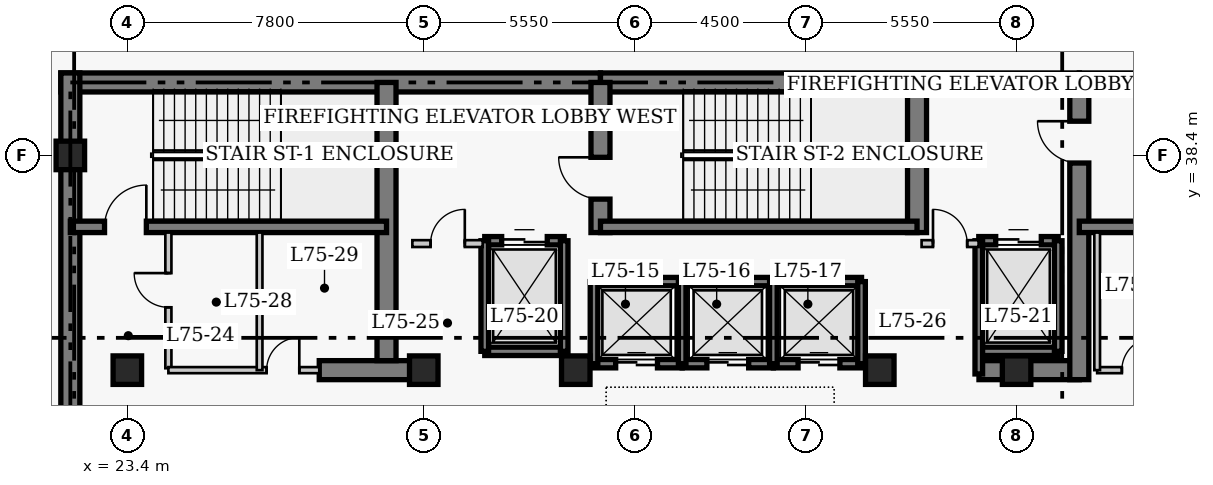
"""IFC4 building model, lengths in metres.
Left out: names, types, materials, properties, quantities, classifications, styles, units other than length and angle.
Written with IfcOpenShell. Run it as: python <this file> out.ifc"""

import sys

from ifc_helpers import new_model, si_unit, direction, frame, frame_2d, origin, origin_2d, place, context, subcontext, project, spatial, rectangle, extrude, element, fill, save


model = new_model("IFC4")
c1 = context("Model", 3, precision=1e-05, world=origin(), true_north=direction((0.0, 1.0)))
c2 = subcontext(c1, "Body", "Model", "MODEL_VIEW")
j1 = project(units=[si_unit("LENGTHUNIT", "METRE"), si_unit("PLANEANGLEUNIT", "RADIAN")], contexts=[c1])
p1 = place(None, origin())
s1 = spatial("IfcSite", under=j1, at=p1, CompositionType="ELEMENT")
p2 = place(p1, origin())
s2 = spatial("IfcBuilding", under=s1, at=p2, CompositionType="ELEMENT")
p3 = place(p2, frame((0.0, 0.0, 302.0)))
s3 = spatial("IfcBuildingStorey", under=s2, at=p3, CompositionType="ELEMENT", Elevation=302.0)
p4 = place(p3, frame((21.65, 40.32, 0.0), z_axis=(0.0, 0.0, 1.0), x_axis=(1.0, 0.0, 0.0)))
e1 = element("IfcWall", 1, at=p4, inside=s3, PredefinedType="SHEAR", context=c2, shape_type="SweptSolid", body=[
    extrude(rectangle(XDim=14.2, YDim=0.5, at=frame_2d((7.1, 0.0))), origin(), (0.0, 0.0, 1.0), 4.6),
])
p5 = place(p3, frame((35.85, 40.32, 0.0), z_axis=(0.0, 0.0, 1.0), x_axis=(1.0, 0.0, 0.0)))
e2 = element("IfcWall", 2, at=p5, inside=s3, PredefinedType="SHEAR", context=c2, shape_type="SweptSolid", body=[
    extrude(rectangle(XDim=12.6, YDim=0.5, at=frame_2d((6.3, 0.0))), origin(), (0.0, 0.0, 1.0), 4.6),
])
p6 = place(p3, frame((48.45, 40.32, 0.0), z_axis=(0.0, 0.0, 1.0), x_axis=(1.0, 0.0, 0.0)))
e3 = element("IfcWall", 3, at=p6, inside=s3, PredefinedType="SHEAR", context=c2, shape_type="SweptSolid", body=[
    extrude(rectangle(XDim=8.57, YDim=0.5, at=frame_2d((4.285, 0.0))), origin(), (0.0, 0.0, 1.0), 4.6),
])
p7 = place(p3, frame((21.9, 27.05, 0.0), z_axis=(0.0, 0.0, 1.0), x_axis=(0.0, 1.0, 0.0)))
e4 = element("IfcWall", 4, at=p7, inside=s3, PredefinedType="SHEAR", context=c2, shape_type="SweptSolid", body=[
    extrude(rectangle(XDim=13.52, YDim=0.5, at=frame_2d((6.76, 0.0))), origin(), (0.0, 0.0, 1.0), 4.6),
])
p8 = place(p3, frame((28.45, 32.75, 0.0), z_axis=(0.0, 0.0, 1.0), x_axis=(1.0, 0.0, 0.0)))
e5 = element("IfcWall", 5, at=p8, inside=s3, PredefinedType="SHEAR", context=c2, shape_type="SweptSolid", body=[
    extrude(rectangle(XDim=2.4, YDim=0.5, at=frame_2d((1.2, 0.0))), origin(), (0.0, 0.0, 1.0), 4.6),
])
p9 = place(p3, frame((45.81, 32.75, 0.0), z_axis=(0.0, 0.0, 1.0), x_axis=(1.0, 0.0, 0.0)))
e6 = element("IfcWall", 6, at=p9, inside=s3, PredefinedType="SHEAR", context=c2, shape_type="SweptSolid", body=[
    extrude(rectangle(XDim=2.64, YDim=0.5, at=frame_2d((1.32, 0.0))), origin(), (0.0, 0.0, 1.0), 4.6),
])
p10 = place(p3, frame((30.22, 33.0, 0.0), z_axis=(0.0, 0.0, 1.0), x_axis=(0.0, 1.0, 0.0)))
e7 = element("IfcWall", 7, at=p10, inside=s3, PredefinedType="SHEAR", context=c2, shape_type="SweptSolid", body=[
    extrude(rectangle(XDim=7.32, YDim=0.5, at=frame_2d((3.66, 0.0))), origin(), (0.0, 0.0, 1.0), 4.6),
])
p11 = place(p3, frame((35.85, 36.37, 0.0), z_axis=(0.0, 0.0, 1.0), x_axis=(0.0, 1.0, 0.0)))
e8 = element("IfcWall", 8, at=p11, inside=s3, PredefinedType="SHEAR", context=c2, shape_type="SweptSolid", body=[
    extrude(rectangle(XDim=3.95, YDim=0.5, at=frame_2d((1.975, 0.0))), origin(), (0.0, 0.0, 1.0), 4.6),
])
p12 = place(p11, frame((0.88, 0.0, 0.0)))
e9 = element("IfcOpeningElement", 9, at=p12, cuts=e8, PredefinedType="OPENING", context=c2, shape_type="SweptSolid", body=[
    extrude(rectangle(XDim=1.1, YDim=2.15, at=frame_2d((0.55, 1.075))), frame((0.0, 0.26, 0.0), z_axis=(0.0, -1.0, 0.0), x_axis=(1.0, 0.0, 0.0)), (0.0, 0.0, 1.0), 0.52),
])
p13 = place(p3, frame((44.18, 36.37, 0.0), z_axis=(0.0, 0.0, 1.0), x_axis=(0.0, 1.0, 0.0)))
e10 = element("IfcWall", 10, at=p13, inside=s3, PredefinedType="SHEAR", context=c2, shape_type="SweptSolid", body=[
    extrude(rectangle(XDim=3.95, YDim=0.5, at=frame_2d((1.975, 0.0))), origin(), (0.0, 0.0, 1.0), 4.6),
])
p14 = place(p3, frame((48.45, 32.5, 0.0), z_axis=(0.0, 0.0, 1.0), x_axis=(0.0, 1.0, 0.0)))
e11 = element("IfcWall", 11, at=p14, inside=s3, PredefinedType="SHEAR", context=c2, shape_type="SweptSolid", body=[
    extrude(rectangle(XDim=7.82, YDim=0.5, at=frame_2d((3.91, 0.0))), origin(), (0.0, 0.0, 1.0), 4.6),
])
p15 = place(p14, frame((5.7, 0.0, 0.0)))
e12 = element("IfcOpeningElement", 12, at=p15, cuts=e11, PredefinedType="OPENING", context=c2, shape_type="SweptSolid", body=[
    extrude(rectangle(XDim=1.1, YDim=2.15, at=frame_2d((0.55, 1.075))), frame((0.0, 0.26, 0.0), z_axis=(0.0, -1.0, 0.0), x_axis=(1.0, 0.0, 0.0)), (0.0, 0.0, 1.0), 0.52),
])
p16 = place(p3, frame((21.9, 36.52, 0.0), z_axis=(0.0, 0.0, 1.0), x_axis=(1.0, 0.0, 0.0)))
e13 = element("IfcWall", 13, at=p16, inside=s3, PredefinedType="SHEAR", context=c2, shape_type="SweptSolid", body=[
    extrude(rectangle(XDim=8.32, YDim=0.3, at=frame_2d((4.16, 0.0))), origin(), (0.0, 0.0, 1.0), 4.6),
])
p17 = place(p16, frame((0.9, 0.0, 0.0)))
e14 = element("IfcOpeningElement", 14, at=p17, cuts=e13, PredefinedType="OPENING", context=c2, shape_type="SweptSolid", body=[
    extrude(rectangle(XDim=1.1, YDim=2.15, at=frame_2d((0.55, 1.075))), frame((0.0, 0.16, 0.0), z_axis=(0.0, -1.0, 0.0), x_axis=(1.0, 0.0, 0.0)), (0.0, 0.0, 1.0), 0.32),
])
p18 = place(p3, frame((35.85, 36.52, 0.0), z_axis=(0.0, 0.0, 1.0), x_axis=(1.0, 0.0, 0.0)))
e15 = element("IfcWall", 15, at=p18, inside=s3, PredefinedType="SHEAR", context=c2, shape_type="SweptSolid", body=[
    extrude(rectangle(XDim=8.33, YDim=0.3, at=frame_2d((4.165, 0.0))), origin(), (0.0, 0.0, 1.0), 4.6),
])
p19 = place(p3, frame((48.45, 36.52, 0.0), z_axis=(0.0, 0.0, 1.0), x_axis=(1.0, 0.0, 0.0)))
e16 = element("IfcWall", 16, at=p19, inside=s3, PredefinedType="SHEAR", context=c2, shape_type="SweptSolid", body=[
    extrude(rectangle(XDim=8.32, YDim=0.3, at=frame_2d((4.16, 0.0))), origin(), (0.0, 0.0, 1.0), 4.6),
])
for number, where, z_axis, x_axis in (
    (17, (21.9, 38.4, 0.0), (0.0, 0.0, 1.0), (1.0, 0.0, 0.0)),
    (18, (23.4, 32.75, 0.0), (0.0, 0.0, 1.0), (1.0, 0.0, 0.0)),
    (19, (31.2, 32.75, 0.0), (0.0, 0.0, 1.0), (1.0, 0.0, 0.0)),
    (20, (35.2, 32.75, 0.0), (0.0, 0.0, 1.0), (1.0, 0.0, 0.0)),
    (21, (43.2, 32.75, 0.0), (0.0, 0.0, 1.0), (1.0, 0.0, 0.0)),
    (22, (46.8, 32.75, 0.0), (0.0, 0.0, 1.0), (1.0, 0.0, 0.0)),
):
    element("IfcColumn", number, at=place(p3, frame(where, z_axis=z_axis, x_axis=x_axis)), inside=s3, PredefinedType="COLUMN", context=c2, shape_type="SweptSolid", body=[
        extrude(rectangle(XDim=0.75, YDim=0.75, at=origin_2d()), origin(), (0.0, 0.0, 1.0), 4.6),
    ])
p20 = place(p3, frame((35.68, 35.08, 0.0), z_axis=(0.0, 0.0, 1.0), x_axis=(1.0, 0.0, 0.0)))
e23 = element("IfcWall", 23, at=p20, inside=s3, PredefinedType="SHEAR", context=c2, shape_type="SweptSolid", body=[
    extrude(rectangle(XDim=2.32, YDim=0.22, at=frame_2d((1.16, 0.0))), origin(), (0.0, 0.0, 1.0), 4.6),
])
p21 = place(p3, frame((35.68, 32.92, 0.0), z_axis=(0.0, 0.0, 1.0), x_axis=(1.0, 0.0, 0.0)))
e24 = element("IfcWall", 24, at=p21, inside=s3, PredefinedType="SHEAR", context=c2, shape_type="SweptSolid", body=[
    extrude(rectangle(XDim=2.32, YDim=0.22, at=frame_2d((1.16, 0.0))), origin(), (0.0, 0.0, 1.0), 4.6),
])
p22 = place(p21, frame((0.57, 0.0, 0.0)))
e25 = element("IfcOpeningElement", 25, at=p22, cuts=e24, PredefinedType="OPENING", context=c2, shape_type="SweptSolid", body=[
    extrude(rectangle(XDim=1.1, YDim=2.15, at=frame_2d((0.55, 1.075))), frame((0.0, 0.12, 0.0), z_axis=(0.0, -1.0, 0.0), x_axis=(1.0, 0.0, 0.0)), (0.0, 0.0, 1.0), 0.24),
])
p23 = place(p3, frame((35.68, 32.92, 0.0), z_axis=(0.0, 0.0, 1.0), x_axis=(0.0, 1.0, 0.0)))
e26 = element("IfcWall", 26, at=p23, inside=s3, PredefinedType="SHEAR", context=c2, shape_type="SweptSolid", body=[
    extrude(rectangle(XDim=2.16, YDim=0.2, at=frame_2d((1.08, 0.0))), origin(), (0.0, 0.0, 1.0), 4.6),
])
p24 = place(p3, frame((38.0, 35.08, 0.0), z_axis=(0.0, 0.0, 1.0), x_axis=(1.0, 0.0, 0.0)))
e27 = element("IfcWall", 27, at=p24, inside=s3, PredefinedType="SHEAR", context=c2, shape_type="SweptSolid", body=[
    extrude(rectangle(XDim=2.4, YDim=0.22, at=frame_2d((1.2, 0.0))), origin(), (0.0, 0.0, 1.0), 4.6),
])
p25 = place(p3, frame((38.0, 32.92, 0.0), z_axis=(0.0, 0.0, 1.0), x_axis=(1.0, 0.0, 0.0)))
e28 = element("IfcWall", 28, at=p25, inside=s3, PredefinedType="SHEAR", context=c2, shape_type="SweptSolid", body=[
    extrude(rectangle(XDim=2.4, YDim=0.22, at=frame_2d((1.2, 0.0))), origin(), (0.0, 0.0, 1.0), 4.6),
])
p26 = place(p25, frame((0.65, 0.0, 0.0)))
e29 = element("IfcOpeningElement", 29, at=p26, cuts=e28, PredefinedType="OPENING", context=c2, shape_type="SweptSolid", body=[
    extrude(rectangle(XDim=1.1, YDim=2.15, at=frame_2d((0.55, 1.075))), frame((0.0, 0.12, 0.0), z_axis=(0.0, -1.0, 0.0), x_axis=(1.0, 0.0, 0.0)), (0.0, 0.0, 1.0), 0.24),
])
p27 = place(p3, frame((38.0, 32.92, 0.0), z_axis=(0.0, 0.0, 1.0), x_axis=(0.0, 1.0, 0.0)))
e30 = element("IfcWall", 30, at=p27, inside=s3, PredefinedType="SHEAR", context=c2, shape_type="SweptSolid", body=[
    extrude(rectangle(XDim=2.16, YDim=0.2, at=frame_2d((1.08, 0.0))), origin(), (0.0, 0.0, 1.0), 4.6),
])
p28 = place(p3, frame((40.4, 35.08, 0.0), z_axis=(0.0, 0.0, 1.0), x_axis=(1.0, 0.0, 0.0)))
e31 = element("IfcWall", 31, at=p28, inside=s3, PredefinedType="SHEAR", context=c2, shape_type="SweptSolid", body=[
    extrude(rectangle(XDim=2.32, YDim=0.22, at=frame_2d((1.16, 0.0))), origin(), (0.0, 0.0, 1.0), 4.6),
])
p29 = place(p3, frame((40.4, 32.92, 0.0), z_axis=(0.0, 0.0, 1.0), x_axis=(1.0, 0.0, 0.0)))
e32 = element("IfcWall", 32, at=p29, inside=s3, PredefinedType="SHEAR", context=c2, shape_type="SweptSolid", body=[
    extrude(rectangle(XDim=2.32, YDim=0.22, at=frame_2d((1.16, 0.0))), origin(), (0.0, 0.0, 1.0), 4.6),
])
p30 = place(p29, frame((0.65, 0.0, 0.0)))
e33 = element("IfcOpeningElement", 33, at=p30, cuts=e32, PredefinedType="OPENING", context=c2, shape_type="SweptSolid", body=[
    extrude(rectangle(XDim=1.1, YDim=2.15, at=frame_2d((0.55, 1.075))), frame((0.0, 0.12, 0.0), z_axis=(0.0, -1.0, 0.0), x_axis=(1.0, 0.0, 0.0)), (0.0, 0.0, 1.0), 0.24),
])
for number, where, z_axis, x_axis in (
    (34, (40.4, 32.92, 0.0), (0.0, 0.0, 1.0), (0.0, 1.0, 0.0)),
    (35, (42.72, 32.92, 0.0), (0.0, 0.0, 1.0), (0.0, 1.0, 0.0)),
):
    element("IfcWall", number, at=place(p3, frame(where, z_axis=z_axis, x_axis=x_axis)), inside=s3, PredefinedType="SHEAR", context=c2, shape_type="SweptSolid", body=[
        extrude(rectangle(XDim=2.16, YDim=0.2, at=frame_2d((1.08, 0.0))), origin(), (0.0, 0.0, 1.0), 4.6),
    ])
p31 = place(p3, frame((32.805, 36.155, 0.0), z_axis=(0.0, 0.0, 1.0), x_axis=(1.0, 0.0, 0.0)))
e36 = element("IfcWall", 36, at=p31, inside=s3, PredefinedType="SHEAR", context=c2, shape_type="SweptSolid", body=[
    extrude(rectangle(XDim=2.09, YDim=0.22, at=frame_2d((1.045, 0.0))), origin(), (0.0, 0.0, 1.0), 4.6),
])
p32 = place(p31, frame((0.445, 0.0, 0.0)))
e37 = element("IfcOpeningElement", 37, at=p32, cuts=e36, PredefinedType="OPENING", context=c2, shape_type="SweptSolid", body=[
    extrude(rectangle(XDim=1.2, YDim=2.15, at=frame_2d((0.6, 1.075))), frame((0.0, 0.12, 0.0), z_axis=(0.0, -1.0, 0.0), x_axis=(1.0, 0.0, 0.0)), (0.0, 0.0, 1.0), 0.24),
])
p33 = place(p3, frame((32.805, 33.245, 0.0), z_axis=(0.0, 0.0, 1.0), x_axis=(1.0, 0.0, 0.0)))
e38 = element("IfcWall", 38, at=p33, inside=s3, PredefinedType="SHEAR", context=c2, shape_type="SweptSolid", body=[
    extrude(rectangle(XDim=2.09, YDim=0.22, at=frame_2d((1.045, 0.0))), origin(), (0.0, 0.0, 1.0), 4.6),
])
for number, where, z_axis, x_axis in (
    (39, (32.805, 33.245, 0.0), (0.0, 0.0, 1.0), (0.0, 1.0, 0.0)),
    (40, (34.895, 33.245, 0.0), (0.0, 0.0, 1.0), (0.0, 1.0, 0.0)),
):
    element("IfcWall", number, at=place(p3, frame(where, z_axis=z_axis, x_axis=x_axis)), inside=s3, PredefinedType="SHEAR", context=c2, shape_type="SweptSolid", body=[
        extrude(rectangle(XDim=2.91, YDim=0.2, at=frame_2d((1.455, 0.0))), origin(), (0.0, 0.0, 1.0), 4.6),
    ])
p34 = place(p3, frame((45.805, 36.155, 0.0), z_axis=(0.0, 0.0, 1.0), x_axis=(1.0, 0.0, 0.0)))
e41 = element("IfcWall", 41, at=p34, inside=s3, PredefinedType="SHEAR", context=c2, shape_type="SweptSolid", body=[
    extrude(rectangle(XDim=2.09, YDim=0.22, at=frame_2d((1.045, 0.0))), origin(), (0.0, 0.0, 1.0), 4.6),
])
p35 = place(p34, frame((0.445, 0.0, 0.0)))
e42 = element("IfcOpeningElement", 42, at=p35, cuts=e41, PredefinedType="OPENING", context=c2, shape_type="SweptSolid", body=[
    extrude(rectangle(XDim=1.2, YDim=2.15, at=frame_2d((0.6, 1.075))), frame((0.0, 0.12, 0.0), z_axis=(0.0, -1.0, 0.0), x_axis=(1.0, 0.0, 0.0)), (0.0, 0.0, 1.0), 0.24),
])
p36 = place(p3, frame((45.805, 33.245, 0.0), z_axis=(0.0, 0.0, 1.0), x_axis=(1.0, 0.0, 0.0)))
e43 = element("IfcWall", 43, at=p36, inside=s3, PredefinedType="SHEAR", context=c2, shape_type="SweptSolid", body=[
    extrude(rectangle(XDim=2.09, YDim=0.22, at=frame_2d((1.045, 0.0))), origin(), (0.0, 0.0, 1.0), 4.6),
])
p37 = place(p3, frame((45.805, 32.65, 0.0), z_axis=(0.0, 0.0, 1.0), x_axis=(0.0, 1.0, 0.0)))
e44 = element("IfcWall", 44, at=p37, inside=s3, PredefinedType="SHEAR", context=c2, shape_type="SweptSolid", body=[
    extrude(rectangle(XDim=3.505, YDim=0.2, at=frame_2d((1.752, 0.0))), origin(), (0.0, 0.0, 1.0), 4.6),
])
p38 = place(p3, frame((47.895, 33.245, 0.0), z_axis=(0.0, 0.0, 1.0), x_axis=(0.0, 1.0, 0.0)))
e45 = element("IfcWall", 45, at=p38, inside=s3, PredefinedType="SHEAR", context=c2, shape_type="SweptSolid", body=[
    extrude(rectangle(XDim=2.91, YDim=0.2, at=frame_2d((1.455, 0.0))), origin(), (0.0, 0.0, 1.0), 4.6),
])
p39 = place(p3, frame((30.9, 36.08, 0.0), z_axis=(0.0, 0.0, 1.0), x_axis=(1.0, 0.0, 0.0)))
e46 = element("IfcWall", 46, at=p39, inside=s3, PredefinedType="PARTITIONING", context=c2, shape_type="SweptSolid", body=[
    extrude(rectangle(XDim=1.85, YDim=0.18, at=frame_2d((0.925, 0.0))), origin(), (0.0, 0.0, 1.0), 4.31),
])
p40 = place(p39, frame((0.48, 0.0, 0.0)))
e47 = element("IfcOpeningElement", 47, at=p40, cuts=e46, PredefinedType="OPENING", context=c2, shape_type="SweptSolid", body=[
    extrude(rectangle(XDim=0.9, YDim=2.15, at=frame_2d((0.45, 1.075))), frame((0.0, 0.1, 0.0), z_axis=(0.0, -1.0, 0.0), x_axis=(1.0, 0.0, 0.0)), (0.0, 0.0, 1.0), 0.2),
])
p41 = place(p3, frame((44.3, 36.08, 0.0), z_axis=(0.0, 0.0, 1.0), x_axis=(1.0, 0.0, 0.0)))
e48 = element("IfcWall", 48, at=p41, inside=s3, PredefinedType="PARTITIONING", context=c2, shape_type="SweptSolid", body=[
    extrude(rectangle(XDim=1.5, YDim=0.18, at=frame_2d((0.75, 0.0))), origin(), (0.0, 0.0, 1.0), 4.31),
])
p42 = place(p41, frame((0.3, 0.0, 0.0)))
e49 = element("IfcOpeningElement", 49, at=p42, cuts=e48, PredefinedType="OPENING", context=c2, shape_type="SweptSolid", body=[
    extrude(rectangle(XDim=0.9, YDim=2.15, at=frame_2d((0.45, 1.075))), frame((0.0, 0.1, 0.0), z_axis=(0.0, -1.0, 0.0), x_axis=(1.0, 0.0, 0.0)), (0.0, 0.0, 1.0), 0.2),
])
p43 = place(p3, frame((24.48, 32.8, 0.0), z_axis=(0.0, 0.0, 1.0), x_axis=(0.0, 1.0, 0.0)))
e50 = element("IfcWall", 50, at=p43, inside=s3, PredefinedType="PARTITIONING", context=c2, shape_type="SweptSolid", body=[
    extrude(rectangle(XDim=3.57, YDim=0.16, at=frame_2d((1.785, 0.0))), origin(), (0.0, 0.0, 1.0), 4.31),
])
p44 = place(p43, frame((1.604, 0.0, 0.0)))
e51 = element("IfcOpeningElement", 51, at=p44, cuts=e50, PredefinedType="OPENING", context=c2, shape_type="SweptSolid", body=[
    extrude(rectangle(XDim=0.9, YDim=2.1, at=frame_2d((0.45, 1.05))), frame((0.0, 0.09, 0.0), z_axis=(0.0, -1.0, 0.0), x_axis=(1.0, 0.0, 0.0)), (0.0, 0.0, 1.0), 0.18),
])
p45 = place(p3, frame((24.48, 32.75, 0.0), z_axis=(0.0, 0.0, 1.0), x_axis=(1.0, 0.0, 0.0)))
e52 = element("IfcWall", 52, at=p45, inside=s3, PredefinedType="PARTITIONING", context=c2, shape_type="SweptSolid", body=[
    extrude(rectangle(XDim=3.97, YDim=0.16, at=frame_2d((1.985, 0.0))), origin(), (0.0, 0.0, 1.0), 4.31),
])
p46 = place(p45, frame((2.585, 0.0, 0.0)))
e53 = element("IfcOpeningElement", 53, at=p46, cuts=e52, PredefinedType="OPENING", context=c2, shape_type="SweptSolid", body=[
    extrude(rectangle(XDim=0.86, YDim=2.05, at=frame_2d((0.43, 1.025))), frame((0.0, 0.09, 0.0), z_axis=(0.0, -1.0, 0.0), x_axis=(1.0, 0.0, 0.0)), (0.0, 0.0, 1.0), 0.18),
])
p47 = place(p3, frame((48.92, 32.75, 0.0), z_axis=(0.0, 0.0, 1.0), x_axis=(1.0, 0.0, 0.0)))
e54 = element("IfcWall", 54, at=p47, inside=s3, PredefinedType="PARTITIONING", context=c2, shape_type="SweptSolid", body=[
    extrude(rectangle(XDim=2.2, YDim=0.16, at=frame_2d((1.1, 0.0))), origin(), (0.0, 0.0, 1.0), 4.31),
])
p48 = place(p47, frame((0.65, 0.0, 0.0)))
e55 = element("IfcOpeningElement", 55, at=p48, cuts=e54, PredefinedType="OPENING", context=c2, shape_type="SweptSolid", body=[
    extrude(rectangle(XDim=0.86, YDim=2.05, at=frame_2d((0.43, 1.025))), frame((0.0, 0.09, 0.0), z_axis=(0.0, -1.0, 0.0), x_axis=(1.0, 0.0, 0.0)), (0.0, 0.0, 1.0), 0.18),
])
for number, where, z_axis, x_axis in (
    (56, (48.92, 32.75, 0.0), (0.0, 0.0, 1.0), (0.0, 1.0, 0.0)),
    (57, (26.88, 32.75, 0.0), (0.0, 0.0, 1.0), (0.0, 1.0, 0.0)),
):
    element("IfcWall", number, at=place(p3, frame(where, z_axis=z_axis, x_axis=x_axis)), inside=s3, PredefinedType="PARTITIONING", context=c2, shape_type="SweptSolid", body=[
        extrude(rectangle(XDim=3.62, YDim=0.15, at=frame_2d((1.81, 0.0))), origin(), (0.0, 0.0, 1.0), 4.31),
    ])
p49 = place(p22, origin())
e58 = element("IfcDoor", 58, at=p49, inside=s3, OperationType="DOUBLE_DOOR_SLIDING", PredefinedType="DOOR", context=c2, shape_type="SweptSolid", body=[
    extrude(rectangle(XDim=1.1, YDim=2.15, at=frame_2d((0.55, 1.075))), frame((0.0, 0.025, 0.0), z_axis=(0.0, -1.0, 0.0), x_axis=(1.0, 0.0, 0.0)), (0.0, 0.0, 1.0), 0.05),
])
fill(e25, e58)
p50 = place(p26, origin())
e59 = element("IfcDoor", 59, at=p50, inside=s3, OperationType="DOUBLE_DOOR_SLIDING", PredefinedType="DOOR", context=c2, shape_type="SweptSolid", body=[
    extrude(rectangle(XDim=1.1, YDim=2.15, at=frame_2d((0.55, 1.075))), frame((0.0, 0.025, 0.0), z_axis=(0.0, -1.0, 0.0), x_axis=(1.0, 0.0, 0.0)), (0.0, 0.0, 1.0), 0.05),
])
fill(e29, e59)
p51 = place(p30, origin())
e60 = element("IfcDoor", 60, at=p51, inside=s3, OperationType="DOUBLE_DOOR_SLIDING", PredefinedType="DOOR", context=c2, shape_type="SweptSolid", body=[
    extrude(rectangle(XDim=1.1, YDim=2.15, at=frame_2d((0.55, 1.075))), frame((0.0, 0.025, 0.0), z_axis=(0.0, -1.0, 0.0), x_axis=(1.0, 0.0, 0.0)), (0.0, 0.0, 1.0), 0.05),
])
fill(e33, e60)
p52 = place(p32, origin())
e61 = element("IfcDoor", 61, at=p52, inside=s3, OperationType="DOUBLE_DOOR_SLIDING", PredefinedType="DOOR", context=c2, shape_type="SweptSolid", body=[
    extrude(rectangle(XDim=1.2, YDim=2.15, at=frame_2d((0.6, 1.075))), frame((0.0, 0.025, 0.0), z_axis=(0.0, -1.0, 0.0), x_axis=(1.0, 0.0, 0.0)), (0.0, 0.0, 1.0), 0.05),
])
fill(e37, e61)
p53 = place(p35, origin())
e62 = element("IfcDoor", 62, at=p53, inside=s3, OperationType="DOUBLE_DOOR_SLIDING", PredefinedType="DOOR", context=c2, shape_type="SweptSolid", body=[
    extrude(rectangle(XDim=1.2, YDim=2.15, at=frame_2d((0.6, 1.075))), frame((0.0, 0.025, 0.0), z_axis=(0.0, -1.0, 0.0), x_axis=(1.0, 0.0, 0.0)), (0.0, 0.0, 1.0), 0.05),
])
fill(e42, e62)
p54 = place(p40, origin())
e63 = element("IfcDoor", 63, at=p54, inside=s3, OperationType="SINGLE_SWING_RIGHT", PredefinedType="DOOR", context=c2, shape_type="SweptSolid", body=[
    extrude(rectangle(XDim=0.9, YDim=2.15, at=frame_2d((0.45, 1.075))), frame((0.0, 0.025, 0.0), z_axis=(0.0, -1.0, 0.0), x_axis=(1.0, 0.0, 0.0)), (0.0, 0.0, 1.0), 0.05),
])
fill(e47, e63)
p55 = place(p42, origin())
e64 = element("IfcDoor", 64, at=p55, inside=s3, OperationType="SINGLE_SWING_LEFT", PredefinedType="DOOR", context=c2, shape_type="SweptSolid", body=[
    extrude(rectangle(XDim=0.9, YDim=2.15, at=frame_2d((0.45, 1.075))), frame((0.0, 0.025, 0.0), z_axis=(0.0, -1.0, 0.0), x_axis=(1.0, 0.0, 0.0)), (0.0, 0.0, 1.0), 0.05),
])
fill(e49, e64)
p56 = place(p44, origin())
e65 = element("IfcDoor", 65, at=p56, inside=s3, OperationType="SINGLE_SWING_RIGHT", PredefinedType="DOOR", context=c2, shape_type="SweptSolid", body=[
    extrude(rectangle(XDim=0.9, YDim=2.1, at=frame_2d((0.45, 1.05))), frame((0.0, 0.025, 0.0), z_axis=(0.0, -1.0, 0.0), x_axis=(1.0, 0.0, 0.0)), (0.0, 0.0, 1.0), 0.05),
])
fill(e51, e65)
p57 = place(p46, origin())
e66 = element("IfcDoor", 66, at=p57, inside=s3, OperationType="SINGLE_SWING_RIGHT", PredefinedType="DOOR", context=c2, shape_type="SweptSolid", body=[
    extrude(rectangle(XDim=0.86, YDim=2.05, at=frame_2d((0.43, 1.025))), frame((0.0, 0.025, 0.0), z_axis=(0.0, -1.0, 0.0), x_axis=(1.0, 0.0, 0.0)), (0.0, 0.0, 1.0), 0.05),
])
fill(e53, e66)
p58 = place(p48, origin())
e67 = element("IfcDoor", 67, at=p58, inside=s3, OperationType="SINGLE_SWING_RIGHT", PredefinedType="DOOR", context=c2, shape_type="SweptSolid", body=[
    extrude(rectangle(XDim=0.86, YDim=2.05, at=frame_2d((0.43, 1.025))), frame((0.0, 0.025, 0.0), z_axis=(0.0, -1.0, 0.0), x_axis=(1.0, 0.0, 0.0)), (0.0, 0.0, 1.0), 0.05),
])
fill(e55, e67)
p59 = place(p17, origin())
e68 = element("IfcDoor", 68, at=p59, inside=s3, OperationType="SINGLE_SWING_RIGHT", PredefinedType="DOOR", context=c2, shape_type="SweptSolid", body=[
    extrude(rectangle(XDim=1.1, YDim=2.15, at=frame_2d((0.55, 1.075))), frame((0.0, 0.025, 0.0), z_axis=(0.0, -1.0, 0.0), x_axis=(1.0, 0.0, 0.0)), (0.0, 0.0, 1.0), 0.05),
])
fill(e14, e68)
p60 = place(p12, origin())
e69 = element("IfcDoor", 69, at=p60, inside=s3, OperationType="SINGLE_SWING_RIGHT", PredefinedType="DOOR", context=c2, shape_type="SweptSolid", body=[
    extrude(rectangle(XDim=1.1, YDim=2.15, at=frame_2d((0.55, 1.075))), frame((0.0, 0.025, 0.0), z_axis=(0.0, -1.0, 0.0), x_axis=(1.0, 0.0, 0.0)), (0.0, 0.0, 1.0), 0.05),
])
fill(e9, e69)
p61 = place(p15, origin())
e70 = element("IfcDoor", 70, at=p61, inside=s3, OperationType="SINGLE_SWING_RIGHT", PredefinedType="DOOR", context=c2, shape_type="SweptSolid", body=[
    extrude(rectangle(XDim=1.1, YDim=2.15, at=frame_2d((0.55, 1.075))), frame((0.0, 0.025, 0.0), z_axis=(0.0, -1.0, 0.0), x_axis=(1.0, 0.0, 0.0)), (0.0, 0.0, 1.0), 0.05),
])
fill(e12, e70)
save(model, sys.argv[1])
